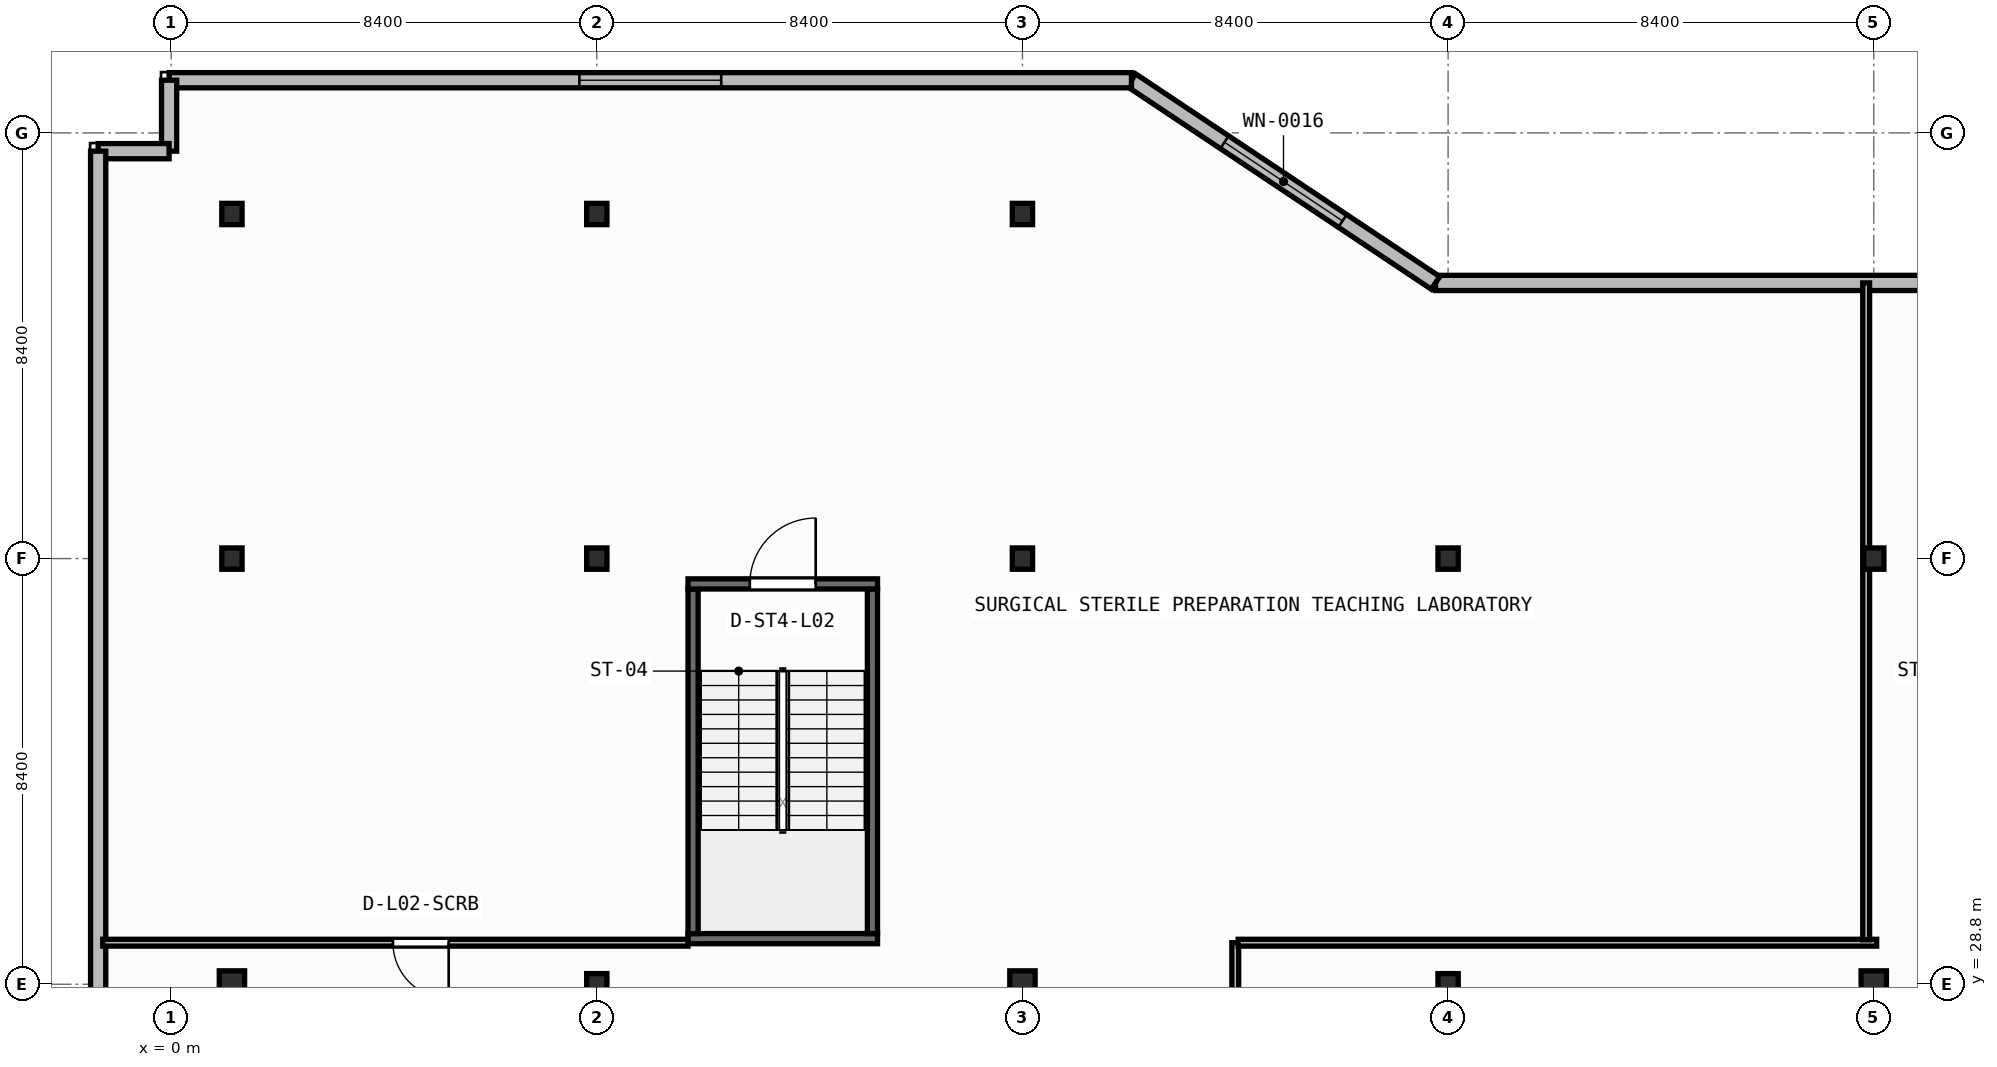
"""IFC4 building model, lengths in metres.
Left out: names, types, materials, properties, quantities, classifications, styles, units other than length and angle.
Written with IfcOpenShell. Run it as: python <this file> out.ifc"""

import sys

from ifc_helpers import new_model, si_unit, direction, frame, frame_2d, origin, origin_2d, place, context, subcontext, project, spatial, rectangle, i_section, extrude, element, fill, save


model = new_model("IFC4")
c1 = context("Model", 3, precision=1e-05, world=origin(), true_north=direction((0.0, 1.0)))
c2 = subcontext(c1, "Body", "Model", "MODEL_VIEW")
j1 = project(units=[si_unit("LENGTHUNIT", "METRE"), si_unit("PLANEANGLEUNIT", "RADIAN")], contexts=[c1])
p1 = place(None, origin())
s1 = spatial("IfcSite", under=j1, at=p1, CompositionType="ELEMENT")
p2 = place(p1, origin())
s2 = spatial("IfcBuilding", under=s1, at=p2, CompositionType="ELEMENT")
p3 = place(p2, frame((0.0, 0.0, 9.0)))
s3 = spatial("IfcBuildingStorey", under=s2, at=p3, CompositionType="ELEMENT", Elevation=9.0)
p4 = place(p3, frame((1.2, 28.8, 0.0), z_axis=(0.0, 0.0, 1.0), x_axis=(1.0, 0.0, 0.0)))
e1 = element("IfcColumn", 1, at=p4, inside=s3, PredefinedType="COLUMN", context=c2, shape_type="SweptSolid", body=[
    extrude(i_section(OverallWidth=0.5, OverallDepth=0.53, WebThickness=0.028, FlangeThickness=0.045, at=origin_2d()), origin(), (0.0, 0.0, 1.0), 4.5),
])
p5 = place(p3, frame((8.4, 28.8, 0.0), z_axis=(0.0, 0.0, 1.0), x_axis=(1.0, 0.0, 0.0)))
e2 = element("IfcColumn", 2, at=p5, inside=s3, PredefinedType="COLUMN", context=c2, shape_type="SweptSolid", body=[
    extrude(i_section(OverallWidth=0.4, OverallDepth=0.42, WebThickness=0.025, FlangeThickness=0.04, at=origin_2d()), origin(), (0.0, 0.0, 1.0), 4.5),
])
p6 = place(p3, frame((16.8, 28.8, 0.0), z_axis=(0.0, 0.0, 1.0), x_axis=(1.0, 0.0, 0.0)))
e3 = element("IfcColumn", 3, at=p6, inside=s3, PredefinedType="COLUMN", context=c2, shape_type="SweptSolid", body=[
    extrude(i_section(OverallWidth=0.5, OverallDepth=0.53, WebThickness=0.028, FlangeThickness=0.045, at=origin_2d()), origin(), (0.0, 0.0, 1.0), 4.5),
])
p7 = place(p3, frame((25.2, 28.8, 0.0), z_axis=(0.0, 0.0, 1.0), x_axis=(1.0, 0.0, 0.0)))
e4 = element("IfcColumn", 4, at=p7, inside=s3, PredefinedType="COLUMN", context=c2, shape_type="SweptSolid", body=[
    extrude(i_section(OverallWidth=0.4, OverallDepth=0.42, WebThickness=0.025, FlangeThickness=0.04, at=origin_2d()), origin(), (0.0, 0.0, 1.0), 4.5),
])
p8 = place(p3, frame((33.6, 28.8, 0.0), z_axis=(0.0, 0.0, 1.0), x_axis=(1.0, 0.0, 0.0)))
e5 = element("IfcColumn", 5, at=p8, inside=s3, PredefinedType="COLUMN", context=c2, shape_type="SweptSolid", body=[
    extrude(i_section(OverallWidth=0.5, OverallDepth=0.53, WebThickness=0.028, FlangeThickness=0.045, at=origin_2d()), origin(), (0.0, 0.0, 1.0), 4.5),
])
for number, where, z_axis, x_axis in (
    (6, (1.2, 37.2, 0.0), (0.0, 0.0, 1.0), (1.0, 0.0, 0.0)),
    (7, (8.4, 37.2, 0.0), (0.0, 0.0, 1.0), (1.0, 0.0, 0.0)),
    (8, (16.8, 37.2, 0.0), (0.0, 0.0, 1.0), (1.0, 0.0, 0.0)),
    (9, (25.2, 37.2, 0.0), (0.0, 0.0, 1.0), (1.0, 0.0, 0.0)),
    (10, (33.6, 37.2, 0.0), (0.0, 0.0, 1.0), (1.0, 0.0, 0.0)),
    (11, (1.2, 44.0, 0.0), (0.0, 0.0, 1.0), (1.0, 0.0, 0.0)),
    (12, (8.4, 44.0, 0.0), (0.0, 0.0, 1.0), (1.0, 0.0, 0.0)),
    (13, (16.8, 44.0, 0.0), (0.0, 0.0, 1.0), (1.0, 0.0, 0.0)),
):
    element("IfcColumn", number, at=place(p3, frame(where, z_axis=z_axis, x_axis=x_axis)), inside=s3, PredefinedType="COLUMN", context=c2, shape_type="SweptSolid", body=[
        extrude(i_section(OverallWidth=0.4, OverallDepth=0.42, WebThickness=0.025, FlangeThickness=0.04, at=origin_2d()), origin(), (0.0, 0.0, 1.0), 4.5),
    ])
p9 = place(p3, frame((43.048, 42.64, 0.0), z_axis=(0.0, 0.0, 1.0), x_axis=(-1.0, 0.0, 0.0)))
e14 = element("IfcWall", 14, at=p9, inside=s3, PredefinedType="STANDARD", context=c2, shape_type="SweptSolid", body=[
    extrude(rectangle(XDim=18.097, YDim=0.3, at=frame_2d((9.048, 0.0))), origin(), (0.0, 0.0, 1.0), 4.25),
])
p10 = place(p9, frame((3.389, 0.0, 0.85)))
e15 = element("IfcOpeningElement", 15, at=p10, cuts=e14, PredefinedType="OPENING", context=c2, shape_type="SweptSolid", body=[
    extrude(rectangle(XDim=2.8, YDim=2.1, at=frame_2d((1.4, 1.05))), frame((0.0, 0.16, 0.0), z_axis=(0.0, -1.0, 0.0), x_axis=(1.0, 0.0, 0.0)), (0.0, 0.0, 1.0), 0.32),
])
p11 = place(p3, frame((24.952, 42.64, 0.0), z_axis=(0.0, 0.0, 1.0), x_axis=(-0.832050294338, 0.554700196225, 0.0)))
e16 = element("IfcWall", 16, at=p11, inside=s3, PredefinedType="STANDARD", context=c2, shape_type="SweptSolid", body=[
    extrude(rectangle(XDim=7.211, YDim=0.3, at=frame_2d((3.605, 0.0))), origin(), (0.0, 0.0, 1.0), 4.25),
])
p12 = place(p11, frame((2.206, 0.0, 0.85)))
e17 = element("IfcOpeningElement", 17, at=p12, cuts=e16, PredefinedType="OPENING", context=c2, shape_type="SweptSolid", body=[
    extrude(rectangle(XDim=2.8, YDim=2.1, at=frame_2d((1.4, 1.05))), frame((0.0, 0.16, 0.0), z_axis=(0.0, -1.0, 0.0), x_axis=(1.0, 0.0, 0.0)), (0.0, 0.0, 1.0), 0.32),
])
p13 = place(p3, frame((18.952, 46.64, 0.0), z_axis=(0.0, 0.0, 1.0), x_axis=(-1.0, 0.0, 0.0)))
e18 = element("IfcWall", 18, at=p13, inside=s3, PredefinedType="STANDARD", context=c2, shape_type="SweptSolid", body=[
    extrude(rectangle(XDim=18.992, YDim=0.3, at=frame_2d((9.496, 0.0))), origin(), (0.0, 0.0, 1.0), 4.25),
])
p14 = place(p13, frame((8.096, 0.0, 0.85)))
e19 = element("IfcOpeningElement", 19, at=p14, cuts=e18, PredefinedType="OPENING", context=c2, shape_type="SweptSolid", body=[
    extrude(rectangle(XDim=2.8, YDim=2.1, at=frame_2d((1.4, 1.05))), frame((0.0, 0.16, 0.0), z_axis=(0.0, -1.0, 0.0), x_axis=(1.0, 0.0, 0.0)), (0.0, 0.0, 1.0), 0.32),
])
for number, where, z_axis, x_axis in (
    (20, (-0.04, 46.64, 0.0), (0.0, 0.0, 1.0), (0.0, -1.0, 0.0)),
    (21, (-0.04, 45.24, 0.0), (0.0, 0.0, 1.0), (-1.0, 0.0, 0.0)),
):
    element("IfcWall", number, at=place(p3, frame(where, z_axis=z_axis, x_axis=x_axis)), inside=s3, PredefinedType="STANDARD", context=c2, shape_type="SweptSolid", body=[
        extrude(rectangle(XDim=1.4, YDim=0.3, at=frame_2d((0.7, 0.0))), origin(), (0.0, 0.0, 1.0), 4.25),
    ])
p15 = place(p3, frame((-1.44, 45.24, 0.0), z_axis=(0.0, 0.0, 1.0), x_axis=(0.0, -1.0, 0.0)))
e22 = element("IfcWall", 22, at=p15, inside=s3, PredefinedType="STANDARD", context=c2, shape_type="SweptSolid", body=[
    extrude(rectangle(XDim=44.48, YDim=0.3, at=frame_2d((22.24, 0.0))), origin(), (0.0, 0.0, 1.0), 4.25),
])
p16 = place(p15, frame((20.84, 0.0, 0.85)))
e23 = element("IfcOpeningElement", 23, at=p16, cuts=e22, PredefinedType="OPENING", context=c2, shape_type="SweptSolid", body=[
    extrude(rectangle(XDim=2.8, YDim=2.1, at=frame_2d((1.4, 1.05))), frame((0.0, 0.16, 0.0), z_axis=(0.0, -1.0, 0.0), x_axis=(1.0, 0.0, 0.0)), (0.0, 0.0, 1.0), 0.32),
])
p17 = place(p3, frame((10.2, 29.7, 0.0), z_axis=(0.0, 0.0, 1.0), x_axis=(1.0, 0.0, 0.0)))
e24 = element("IfcWall", 24, at=p17, inside=s3, PredefinedType="SHEAR", context=c2, shape_type="SweptSolid", body=[
    extrude(rectangle(XDim=3.74, YDim=0.2, at=frame_2d((1.87, 0.0))), origin(), (0.0, 0.0, 1.0), 4.25),
])
for number, where, z_axis, x_axis in (
    (25, (10.3, 29.8, 0.0), (0.0, 0.0, 1.0), (0.0, 1.0, 0.0)),
    (26, (13.84, 29.8, 0.0), (0.0, 0.0, 1.0), (0.0, 1.0, 0.0)),
):
    element("IfcWall", number, at=place(p3, frame(where, z_axis=z_axis, x_axis=x_axis)), inside=s3, PredefinedType="SHEAR", context=c2, shape_type="SweptSolid", body=[
        extrude(rectangle(XDim=6.8, YDim=0.2, at=frame_2d((3.4, 0.0))), origin(), (0.0, 0.0, 1.0), 4.25),
    ])
p18 = place(p3, frame((10.2, 36.7, 0.0), z_axis=(0.0, 0.0, 1.0), x_axis=(1.0, 0.0, 0.0)))
e27 = element("IfcWall", 27, at=p18, inside=s3, PredefinedType="SHEAR", context=c2, shape_type="SweptSolid", body=[
    extrude(rectangle(XDim=3.74, YDim=0.2, at=frame_2d((1.87, 0.0))), origin(), (0.0, 0.0, 1.0), 4.25),
])
p19 = place(p18, frame((1.22, 0.0, 0.0)))
e28 = element("IfcOpeningElement", 28, at=p19, cuts=e27, PredefinedType="OPENING", context=c2, shape_type="SweptSolid", body=[
    extrude(rectangle(XDim=1.3, YDim=2.15, at=frame_2d((0.65, 1.075))), frame((0.0, 0.11, 0.0), z_axis=(0.0, -1.0, 0.0), x_axis=(1.0, 0.0, 0.0)), (0.0, 0.0, 1.0), 0.22),
])
p20 = place(p3, frame((21.0, 14.865, 0.0), z_axis=(0.0, 0.0, 1.0), x_axis=(0.0, 1.0, 0.0)))
e29 = element("IfcWall", 29, at=p20, inside=s3, PredefinedType="PARTITIONING", context=c2, shape_type="SweptSolid", body=[
    extrude(rectangle(XDim=14.755, YDim=0.135, at=frame_2d((7.377, 0.0))), origin(), (0.0, 0.0, 1.0), 4.25),
])
p21 = place(p3, frame((10.2, 29.62, 0.0), z_axis=(0.0, 0.0, 1.0), x_axis=(-1.0, 0.0, 0.0)))
e30 = element("IfcWall", 30, at=p21, inside=s3, PredefinedType="PARTITIONING", context=c2, shape_type="SweptSolid", body=[
    extrude(rectangle(XDim=11.55, YDim=0.135, at=frame_2d((5.775, 0.0))), origin(), (0.0, 0.0, 1.0), 4.25),
])
p22 = place(p21, frame((4.722, 0.0, 0.0)))
e31 = element("IfcOpeningElement", 31, at=p22, cuts=e30, PredefinedType="OPENING", context=c2, shape_type="SweptSolid", body=[
    extrude(rectangle(XDim=1.1, YDim=2.1, at=frame_2d((0.55, 1.05))), frame((0.0, 0.077, 0.0), z_axis=(0.0, -1.0, 0.0), x_axis=(1.0, 0.0, 0.0)), (0.0, 0.0, 1.0), 0.155),
])
p23 = place(p3, frame((33.657, 29.62, 0.0), z_axis=(0.0, 0.0, 1.0), x_axis=(-1.0, 0.0, 0.0)))
e32 = element("IfcWall", 32, at=p23, inside=s3, PredefinedType="PARTITIONING", context=c2, shape_type="SweptSolid", body=[
    extrude(rectangle(XDim=12.6, YDim=0.135, at=frame_2d((6.3, 0.0))), origin(), (0.0, 0.0, 1.0), 4.25),
])
p24 = place(p3, frame((33.45, 29.677, 0.0), z_axis=(0.0, 0.0, 1.0), x_axis=(0.0, 1.0, 0.0)))
e33 = element("IfcWall", 33, at=p24, inside=s3, PredefinedType="PARTITIONING", context=c2, shape_type="SweptSolid", body=[
    extrude(rectangle(XDim=12.962, YDim=0.135, at=frame_2d((6.481, 0.0))), origin(), (0.0, 0.0, 1.0), 3.623),
])
p25 = place(p12, origin())
e34 = element("IfcWindow", 34, at=p25, inside=s3, PartitioningType="SINGLE_PANEL", PredefinedType="WINDOW", context=c2, shape_type="SweptSolid", body=[
    extrude(rectangle(XDim=2.8, YDim=2.1, at=frame_2d((1.4, 1.05))), frame((0.0, 0.03, 0.0), z_axis=(0.0, -1.0, 0.0), x_axis=(1.0, 0.0, 0.0)), (0.0, 0.0, 1.0), 0.06),
])
fill(e17, e34)
p26 = place(p14, origin())
e35 = element("IfcWindow", 35, at=p26, inside=s3, PartitioningType="SINGLE_PANEL", PredefinedType="WINDOW", context=c2, shape_type="SweptSolid", body=[
    extrude(rectangle(XDim=2.8, YDim=2.1, at=frame_2d((1.4, 1.05))), frame((0.0, 0.03, 0.0), z_axis=(0.0, -1.0, 0.0), x_axis=(1.0, 0.0, 0.0)), (0.0, 0.0, 1.0), 0.06),
])
fill(e19, e35)
p27 = place(p19, origin())
e36 = element("IfcDoor", 36, at=p27, inside=s3, OperationType="SINGLE_SWING_RIGHT", PredefinedType="DOOR", context=c2, shape_type="SweptSolid", body=[
    extrude(rectangle(XDim=1.3, YDim=2.15, at=frame_2d((0.65, 1.075))), frame((0.0, 0.025, 0.0), z_axis=(0.0, -1.0, 0.0), x_axis=(1.0, 0.0, 0.0)), (0.0, 0.0, 1.0), 0.05),
])
fill(e28, e36)
p28 = place(p22, origin())
e37 = element("IfcDoor", 37, at=p28, inside=s3, OperationType="SINGLE_SWING_LEFT", PredefinedType="DOOR", context=c2, shape_type="SweptSolid", body=[
    extrude(rectangle(XDim=1.1, YDim=2.1, at=frame_2d((0.55, 1.05))), frame((0.0, 0.025, 0.0), z_axis=(0.0, -1.0, 0.0), x_axis=(1.0, 0.0, 0.0)), (0.0, 0.0, 1.0), 0.05),
])
fill(e31, e37)
save(model, sys.argv[1])
